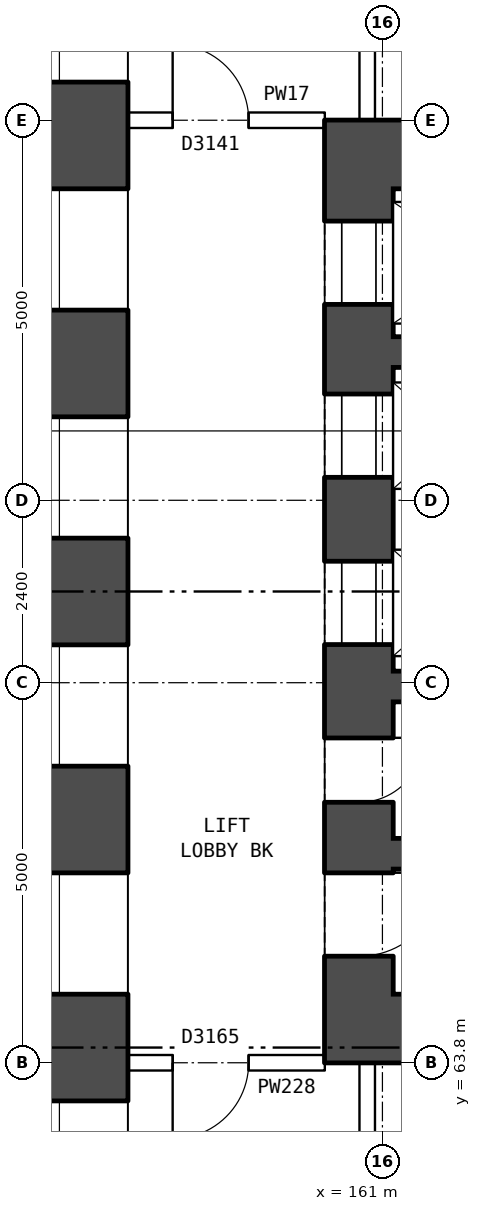
"""IFC4 building model, lengths in metres.
Left out: names, types, materials, properties, quantities, classifications, styles, units other than length and angle.
Written with IfcOpenShell. Run it as: python <this file> out.ifc"""

import sys

from ifc_helpers import new_model, si_unit, direction, frame, frame_2d, origin, place, context, subcontext, project, spatial, rectangle, extrude, element, fill, save


model = new_model("IFC4")
c1 = context("Model", 3, precision=1e-05, world=origin(), true_north=direction((0.0, 1.0)))
c2 = subcontext(c1, "Body", "Model", "MODEL_VIEW")
j1 = project(units=[si_unit("LENGTHUNIT", "METRE"), si_unit("PLANEANGLEUNIT", "RADIAN")], contexts=[c1])
p1 = place(None, origin())
s1 = spatial("IfcSite", under=j1, at=p1, CompositionType="ELEMENT")
p2 = place(p1, origin())
s2 = spatial("IfcBuilding", under=s1, at=p2, CompositionType="ELEMENT")
p3 = place(p2, frame((0.0, 0.0, 5.5)))
s3 = spatial("IfcBuildingStorey", under=s2, at=p3, CompositionType="ELEMENT", Elevation=5.5)
p4 = place(p3, frame((157.05, 56.4, -0.3), z_axis=(0.0, 0.0, 1.0), x_axis=(0.0, 1.0, 0.0)))
e1 = element("IfcWall", 1, at=p4, inside=s3, PredefinedType="SHEAR", context=c2, shape_type="SweptSolid", body=[
    extrude(rectangle(XDim=27.2, YDim=1.2, at=frame_2d((13.6, 0.0))), origin(), (0.0, 0.0, 1.0), 4.6),
])
p5 = place(p4, frame((2.3, 0.0, 0.8)))
e2 = element("IfcOpeningElement", 2, at=p5, cuts=e1, PredefinedType="OPENING", context=c2, shape_type="SweptSolid", body=[
    extrude(rectangle(XDim=1.6, YDim=1.8, at=frame_2d((0.8, 0.9))), frame((0.0, 0.61, 0.0), z_axis=(0.0, -1.0, 0.0), x_axis=(1.0, 0.0, 0.0)), (0.0, 0.0, 1.0), 1.22),
])
p6 = place(p4, frame((5.3, 0.0, 0.8)))
e3 = element("IfcOpeningElement", 3, at=p6, cuts=e1, PredefinedType="OPENING", context=c2, shape_type="SweptSolid", body=[
    extrude(rectangle(XDim=1.6, YDim=1.8, at=frame_2d((0.8, 0.9))), frame((0.0, 0.61, 0.0), z_axis=(0.0, -1.0, 0.0), x_axis=(1.0, 0.0, 0.0)), (0.0, 0.0, 1.0), 1.22),
])
p7 = place(p4, frame((8.3, 0.0, 0.8)))
e4 = element("IfcOpeningElement", 4, at=p7, cuts=e1, PredefinedType="OPENING", context=c2, shape_type="SweptSolid", body=[
    extrude(rectangle(XDim=1.6, YDim=1.8, at=frame_2d((0.8, 0.9))), frame((0.0, 0.61, 0.0), z_axis=(0.0, -1.0, 0.0), x_axis=(1.0, 0.0, 0.0)), (0.0, 0.0, 1.0), 1.22),
])
p8 = place(p4, frame((11.3, 0.0, 0.8)))
e5 = element("IfcOpeningElement", 5, at=p8, cuts=e1, PredefinedType="OPENING", context=c2, shape_type="SweptSolid", body=[
    extrude(rectangle(XDim=1.6, YDim=1.8, at=frame_2d((0.8, 0.9))), frame((0.0, 0.61, 0.0), z_axis=(0.0, -1.0, 0.0), x_axis=(1.0, 0.0, 0.0)), (0.0, 0.0, 1.0), 1.22),
])
p9 = place(p4, frame((14.3, 0.0, 0.8)))
e6 = element("IfcOpeningElement", 6, at=p9, cuts=e1, PredefinedType="OPENING", context=c2, shape_type="SweptSolid", body=[
    extrude(rectangle(XDim=1.6, YDim=1.8, at=frame_2d((0.8, 0.9))), frame((0.0, 0.61, 0.0), z_axis=(0.0, -1.0, 0.0), x_axis=(1.0, 0.0, 0.0)), (0.0, 0.0, 1.0), 1.22),
])
p10 = place(p4, frame((17.3, 0.0, 0.8)))
e7 = element("IfcOpeningElement", 7, at=p10, cuts=e1, PredefinedType="OPENING", context=c2, shape_type="SweptSolid", body=[
    extrude(rectangle(XDim=1.6, YDim=1.8, at=frame_2d((0.8, 0.9))), frame((0.0, 0.61, 0.0), z_axis=(0.0, -1.0, 0.0), x_axis=(1.0, 0.0, 0.0)), (0.0, 0.0, 1.0), 1.22),
])
p11 = place(p4, frame((20.3, 0.0, 0.8)))
e8 = element("IfcOpeningElement", 8, at=p11, cuts=e1, PredefinedType="OPENING", context=c2, shape_type="SweptSolid", body=[
    extrude(rectangle(XDim=1.6, YDim=1.8, at=frame_2d((0.8, 0.9))), frame((0.0, 0.61, 0.0), z_axis=(0.0, -1.0, 0.0), x_axis=(1.0, 0.0, 0.0)), (0.0, 0.0, 1.0), 1.22),
])
p12 = place(p4, frame((23.3, 0.0, 0.8)))
e9 = element("IfcOpeningElement", 9, at=p12, cuts=e1, PredefinedType="OPENING", context=c2, shape_type="SweptSolid", body=[
    extrude(rectangle(XDim=1.6, YDim=1.8, at=frame_2d((0.8, 0.9))), frame((0.0, 0.61, 0.0), z_axis=(0.0, -1.0, 0.0), x_axis=(1.0, 0.0, 0.0)), (0.0, 0.0, 1.0), 1.22),
])
p13 = place(p3, frame((160.69, 75.3, 0.0), z_axis=(0.0, 0.0, 1.0), x_axis=(0.0, -1.0, 0.0)))
e10 = element("IfcWall", 10, at=p13, inside=s3, PredefinedType="SHEAR", context=c2, shape_type="SweptSolid", body=[
    extrude(rectangle(XDim=10.6, YDim=0.9, at=frame_2d((5.3, 0.0))), origin(), (0.0, 0.0, 1.0), 4.3),
])
p14 = place(p13, frame((0.425, 0.0, 0.0)))
e11 = element("IfcOpeningElement", 11, at=p14, cuts=e10, PredefinedType="OPENING", context=c2, shape_type="SweptSolid", body=[
    extrude(rectangle(XDim=1.1, YDim=2.1, at=frame_2d((0.55, 1.05))), frame((0.0, 0.46, 0.0), z_axis=(0.0, -1.0, 0.0), x_axis=(1.0, 0.0, 0.0)), (0.0, 0.0, 1.0), 0.92),
])
p15 = place(p13, frame((2.7, 0.0, 0.0)))
e12 = element("IfcOpeningElement", 12, at=p15, cuts=e10, PredefinedType="OPENING", context=c2, shape_type="SweptSolid", body=[
    extrude(rectangle(XDim=1.1, YDim=2.1, at=frame_2d((0.55, 1.05))), frame((0.0, 0.46, 0.0), z_axis=(0.0, -1.0, 0.0), x_axis=(1.0, 0.0, 0.0)), (0.0, 0.0, 1.0), 0.92),
])
p16 = place(p13, frame((4.9, 0.0, 0.0)))
e13 = element("IfcOpeningElement", 13, at=p16, cuts=e10, PredefinedType="OPENING", context=c2, shape_type="SweptSolid", body=[
    extrude(rectangle(XDim=1.1, YDim=2.1, at=frame_2d((0.55, 1.05))), frame((0.0, 0.46, 0.0), z_axis=(0.0, -1.0, 0.0), x_axis=(1.0, 0.0, 0.0)), (0.0, 0.0, 1.0), 0.92),
])
p17 = place(p13, frame((9.0, 0.0, 0.0)))
e14 = element("IfcOpeningElement", 14, at=p17, cuts=e10, PredefinedType="OPENING", context=c2, shape_type="SweptSolid", body=[
    extrude(rectangle(XDim=1.1, YDim=2.1, at=frame_2d((0.55, 1.05))), frame((0.0, 0.46, 0.0), z_axis=(0.0, -1.0, 0.0), x_axis=(1.0, 0.0, 0.0)), (0.0, 0.0, 1.0), 0.92),
])
p18 = place(p13, frame((7.225, 0.0, 0.0)))
e15 = element("IfcOpeningElement", 15, at=p18, cuts=e10, PredefinedType="OPENING", context=c2, shape_type="SweptSolid", body=[
    extrude(rectangle(XDim=0.85, YDim=2.1, at=frame_2d((0.425, 1.05))), frame((0.0, 0.46, 0.0), z_axis=(0.0, -1.0, 0.0), x_axis=(1.0, 0.0, 0.0)), (0.0, 0.0, 1.0), 0.92),
])
for number, where, z_axis, x_axis in (
    (16, (160.24, 75.75, 0.0), (0.0, 0.0, 1.0), (1.0, 0.0, 0.0)),
    (17, (160.24, 64.25, 0.0), (0.0, 0.0, 1.0), (1.0, 0.0, 0.0)),
):
    element("IfcWall", number, at=place(p3, frame(where, z_axis=z_axis, x_axis=x_axis)), inside=s3, PredefinedType="SHEAR", context=c2, shape_type="SweptSolid", body=[
        extrude(rectangle(XDim=8.4, YDim=0.9, at=frame_2d((4.2, 0.0))), origin(), (0.0, 0.0, 1.0), 4.3),
    ])
p19 = place(p3, frame((161.14, 73.15, 0.0), z_axis=(0.0, 0.0, 1.0), x_axis=(1.0, 0.0, 0.0)))
e18 = element("IfcWall", 18, at=p19, inside=s3, PredefinedType="SHEAR", context=c2, shape_type="SweptSolid", body=[
    extrude(rectangle(XDim=3.7, YDim=0.4, at=frame_2d((1.85, 0.0))), origin(), (0.0, 0.0, 1.0), 4.3),
])
p20 = place(p3, frame((161.14, 68.75, 0.0), z_axis=(0.0, 0.0, 1.0), x_axis=(1.0, 0.0, 0.0)))
e19 = element("IfcWall", 19, at=p20, inside=s3, PredefinedType="SHEAR", context=c2, shape_type="SweptSolid", body=[
    extrude(rectangle(XDim=6.6, YDim=0.4, at=frame_2d((3.3, 0.0))), origin(), (0.0, 0.0, 1.0), 4.3),
])
p21 = place(p20, frame((4.25, 0.0, 0.0)))
e20 = element("IfcOpeningElement", 20, at=p21, cuts=e19, PredefinedType="OPENING", context=c2, shape_type="SweptSolid", body=[
    extrude(rectangle(XDim=1.1, YDim=2.1, at=frame_2d((0.55, 1.05))), frame((0.0, 0.21, 0.0), z_axis=(0.0, -1.0, 0.0), x_axis=(1.0, 0.0, 0.0)), (0.0, 0.0, 1.0), 0.42),
])
p22 = place(p20, frame((2.6, 0.0, 0.0)))
e21 = element("IfcOpeningElement", 21, at=p22, cuts=e19, PredefinedType="OPENING", context=c2, shape_type="SweptSolid", body=[
    extrude(rectangle(XDim=0.85, YDim=2.1, at=frame_2d((0.425, 1.05))), frame((0.0, 0.21, 0.0), z_axis=(0.0, -1.0, 0.0), x_axis=(1.0, 0.0, 0.0)), (0.0, 0.0, 1.0), 0.42),
])
p23 = place(p3, frame((161.14, 66.55, 0.0), z_axis=(0.0, 0.0, 1.0), x_axis=(1.0, 0.0, 0.0)))
e22 = element("IfcWall", 22, at=p23, inside=s3, PredefinedType="SHEAR", context=c2, shape_type="SweptSolid", body=[
    extrude(rectangle(XDim=1.95, YDim=0.4, at=frame_2d((0.975, 0.0))), origin(), (0.0, 0.0, 1.0), 4.3),
])
p24 = place(p3, frame((157.65, 63.8, 0.0), z_axis=(0.0, 0.0, 1.0), x_axis=(1.0, 0.0, 0.0)))
e23 = element("IfcWall", 23, at=p24, inside=s3, PredefinedType="PARTITIONING", context=c2, shape_type="SweptSolid", body=[
    extrude(rectangle(XDim=2.59, YDim=0.2, at=frame_2d((1.295, 0.0))), origin(), (0.0, 0.0, 1.0), 4.3),
])
p25 = place(p24, frame((0.59, 0.0, 0.0)))
e24 = element("IfcOpeningElement", 24, at=p25, cuts=e23, PredefinedType="OPENING", context=c2, shape_type="SweptSolid", body=[
    extrude(rectangle(XDim=1.0, YDim=2.1, at=frame_2d((0.5, 1.05))), frame((0.0, 0.11, 0.0), z_axis=(0.0, -1.0, 0.0), x_axis=(1.0, 0.0, 0.0)), (0.0, 0.0, 1.0), 0.22),
])
p26 = place(p3, frame((157.65, 76.2, 0.0), z_axis=(0.0, 0.0, 1.0), x_axis=(1.0, 0.0, 0.0)))
e25 = element("IfcWall", 25, at=p26, inside=s3, PredefinedType="PARTITIONING", context=c2, shape_type="SweptSolid", body=[
    extrude(rectangle(XDim=2.59, YDim=0.2, at=frame_2d((1.295, 0.0))), origin(), (0.0, 0.0, 1.0), 4.3),
])
p27 = place(p26, frame((0.59, 0.0, 0.0)))
e26 = element("IfcOpeningElement", 26, at=p27, cuts=e25, PredefinedType="OPENING", context=c2, shape_type="SweptSolid", body=[
    extrude(rectangle(XDim=1.0, YDim=2.1, at=frame_2d((0.5, 1.05))), frame((0.0, 0.11, 0.0), z_axis=(0.0, -1.0, 0.0), x_axis=(1.0, 0.0, 0.0)), (0.0, 0.0, 1.0), 0.22),
])
for number, where, z_axis, x_axis in (
    (27, (160.8, 60.7, 0.0), (0.0, 0.0, 1.0), (0.0, 1.0, 0.0)),
    (28, (160.8, 76.2, 0.0), (0.0, 0.0, 1.0), (0.0, 1.0, 0.0)),
):
    element("IfcWall", number, at=place(p3, frame(where, z_axis=z_axis, x_axis=x_axis)), inside=s3, PredefinedType="PARTITIONING", context=c2, shape_type="SweptSolid", body=[
        extrude(rectangle(XDim=3.1, YDim=0.2, at=frame_2d((1.55, 0.0))), origin(), (0.0, 0.0, 1.0), 4.3),
    ])
p28 = place(p6, origin())
e29 = element("IfcWindow", 29, at=p28, inside=s3, PartitioningType="SINGLE_PANEL", PredefinedType="WINDOW", context=c2, shape_type="SweptSolid", body=[
    extrude(rectangle(XDim=1.6, YDim=1.8, at=frame_2d((0.8, 0.9))), frame((0.0, 0.33, 0.0), z_axis=(0.0, -1.0, 0.0), x_axis=(1.0, 0.0, 0.0)), (0.0, 0.0, 1.0), 0.06),
])
fill(e3, e29)
p29 = place(p7, origin())
e30 = element("IfcWindow", 30, at=p29, inside=s3, PartitioningType="SINGLE_PANEL", PredefinedType="WINDOW", context=c2, shape_type="SweptSolid", body=[
    extrude(rectangle(XDim=1.6, YDim=1.8, at=frame_2d((0.8, 0.9))), frame((0.0, 0.33, 0.0), z_axis=(0.0, -1.0, 0.0), x_axis=(1.0, 0.0, 0.0)), (0.0, 0.0, 1.0), 0.06),
])
fill(e4, e30)
p30 = place(p8, origin())
e31 = element("IfcWindow", 31, at=p30, inside=s3, PartitioningType="SINGLE_PANEL", PredefinedType="WINDOW", context=c2, shape_type="SweptSolid", body=[
    extrude(rectangle(XDim=1.6, YDim=1.8, at=frame_2d((0.8, 0.9))), frame((0.0, 0.33, 0.0), z_axis=(0.0, -1.0, 0.0), x_axis=(1.0, 0.0, 0.0)), (0.0, 0.0, 1.0), 0.06),
])
fill(e5, e31)
p31 = place(p9, origin())
e32 = element("IfcWindow", 32, at=p31, inside=s3, PartitioningType="SINGLE_PANEL", PredefinedType="WINDOW", context=c2, shape_type="SweptSolid", body=[
    extrude(rectangle(XDim=1.6, YDim=1.8, at=frame_2d((0.8, 0.9))), frame((0.0, 0.33, 0.0), z_axis=(0.0, -1.0, 0.0), x_axis=(1.0, 0.0, 0.0)), (0.0, 0.0, 1.0), 0.06),
])
fill(e6, e32)
p32 = place(p10, origin())
e33 = element("IfcWindow", 33, at=p32, inside=s3, PartitioningType="SINGLE_PANEL", PredefinedType="WINDOW", context=c2, shape_type="SweptSolid", body=[
    extrude(rectangle(XDim=1.6, YDim=1.8, at=frame_2d((0.8, 0.9))), frame((0.0, 0.33, 0.0), z_axis=(0.0, -1.0, 0.0), x_axis=(1.0, 0.0, 0.0)), (0.0, 0.0, 1.0), 0.06),
])
fill(e7, e33)
p33 = place(p11, origin())
e34 = element("IfcWindow", 34, at=p33, inside=s3, PartitioningType="SINGLE_PANEL", PredefinedType="WINDOW", context=c2, shape_type="SweptSolid", body=[
    extrude(rectangle(XDim=1.6, YDim=1.8, at=frame_2d((0.8, 0.9))), frame((0.0, 0.33, 0.0), z_axis=(0.0, -1.0, 0.0), x_axis=(1.0, 0.0, 0.0)), (0.0, 0.0, 1.0), 0.06),
])
fill(e8, e34)
p34 = place(p14, origin())
e35 = element("IfcDoor", 35, at=p34, inside=s3, OperationType="DOUBLE_DOOR_SLIDING", PredefinedType="DOOR", context=c2, shape_type="SweptSolid", body=[
    extrude(rectangle(XDim=1.1, YDim=2.1, at=frame_2d((0.55, 1.05))), frame((0.0, 0.435, 0.0), z_axis=(0.0, -1.0, 0.0), x_axis=(1.0, 0.0, 0.0)), (0.0, 0.0, 1.0), 0.05),
])
fill(e11, e35)
p35 = place(p15, origin())
e36 = element("IfcDoor", 36, at=p35, inside=s3, OperationType="DOUBLE_DOOR_SLIDING", PredefinedType="DOOR", context=c2, shape_type="SweptSolid", body=[
    extrude(rectangle(XDim=1.1, YDim=2.1, at=frame_2d((0.55, 1.05))), frame((0.0, 0.435, 0.0), z_axis=(0.0, -1.0, 0.0), x_axis=(1.0, 0.0, 0.0)), (0.0, 0.0, 1.0), 0.05),
])
fill(e12, e36)
p36 = place(p16, origin())
e37 = element("IfcDoor", 37, at=p36, inside=s3, OperationType="DOUBLE_DOOR_SLIDING", PredefinedType="DOOR", context=c2, shape_type="SweptSolid", body=[
    extrude(rectangle(XDim=1.1, YDim=2.1, at=frame_2d((0.55, 1.05))), frame((0.0, 0.435, 0.0), z_axis=(0.0, -1.0, 0.0), x_axis=(1.0, 0.0, 0.0)), (0.0, 0.0, 1.0), 0.05),
])
fill(e13, e37)
p37 = place(p17, origin())
e38 = element("IfcDoor", 38, at=p37, inside=s3, OperationType="SINGLE_SWING_LEFT", PredefinedType="DOOR", context=c2, shape_type="SweptSolid", body=[
    extrude(rectangle(XDim=1.1, YDim=2.1, at=frame_2d((0.55, 1.05))), frame((0.0, 0.435, 0.0), z_axis=(0.0, -1.0, 0.0), x_axis=(1.0, 0.0, 0.0)), (0.0, 0.0, 1.0), 0.05),
])
fill(e14, e38)
p38 = place(p18, origin())
e39 = element("IfcDoor", 39, at=p38, inside=s3, OperationType="SINGLE_SWING_LEFT", PredefinedType="DOOR", context=c2, shape_type="SweptSolid", body=[
    extrude(rectangle(XDim=0.85, YDim=2.1, at=frame_2d((0.425, 1.05))), frame((0.0, 0.435, 0.0), z_axis=(0.0, -1.0, 0.0), x_axis=(1.0, 0.0, 0.0)), (0.0, 0.0, 1.0), 0.05),
])
fill(e15, e39)
p39 = place(p25, frame((1.0, 0.0, 0.0), z_axis=(0.0, 0.0, 1.0), x_axis=(-1.0, 0.0, 0.0)))
e40 = element("IfcDoor", 40, at=p39, inside=s3, OperationType="SINGLE_SWING_RIGHT", PredefinedType="DOOR", context=c2, shape_type="SweptSolid", body=[
    extrude(rectangle(XDim=1.0, YDim=2.1, at=frame_2d((0.5, 1.05))), frame((0.0, 0.025, 0.0), z_axis=(0.0, -1.0, 0.0), x_axis=(1.0, 0.0, 0.0)), (0.0, 0.0, 1.0), 0.05),
])
fill(e24, e40)
p40 = place(p27, origin())
e41 = element("IfcDoor", 41, at=p40, inside=s3, OperationType="SINGLE_SWING_LEFT", PredefinedType="DOOR", context=c2, shape_type="SweptSolid", body=[
    extrude(rectangle(XDim=1.0, YDim=2.1, at=frame_2d((0.5, 1.05))), frame((0.0, 0.025, 0.0), z_axis=(0.0, -1.0, 0.0), x_axis=(1.0, 0.0, 0.0)), (0.0, 0.0, 1.0), 0.05),
])
fill(e26, e41)
save(model, sys.argv[1])
